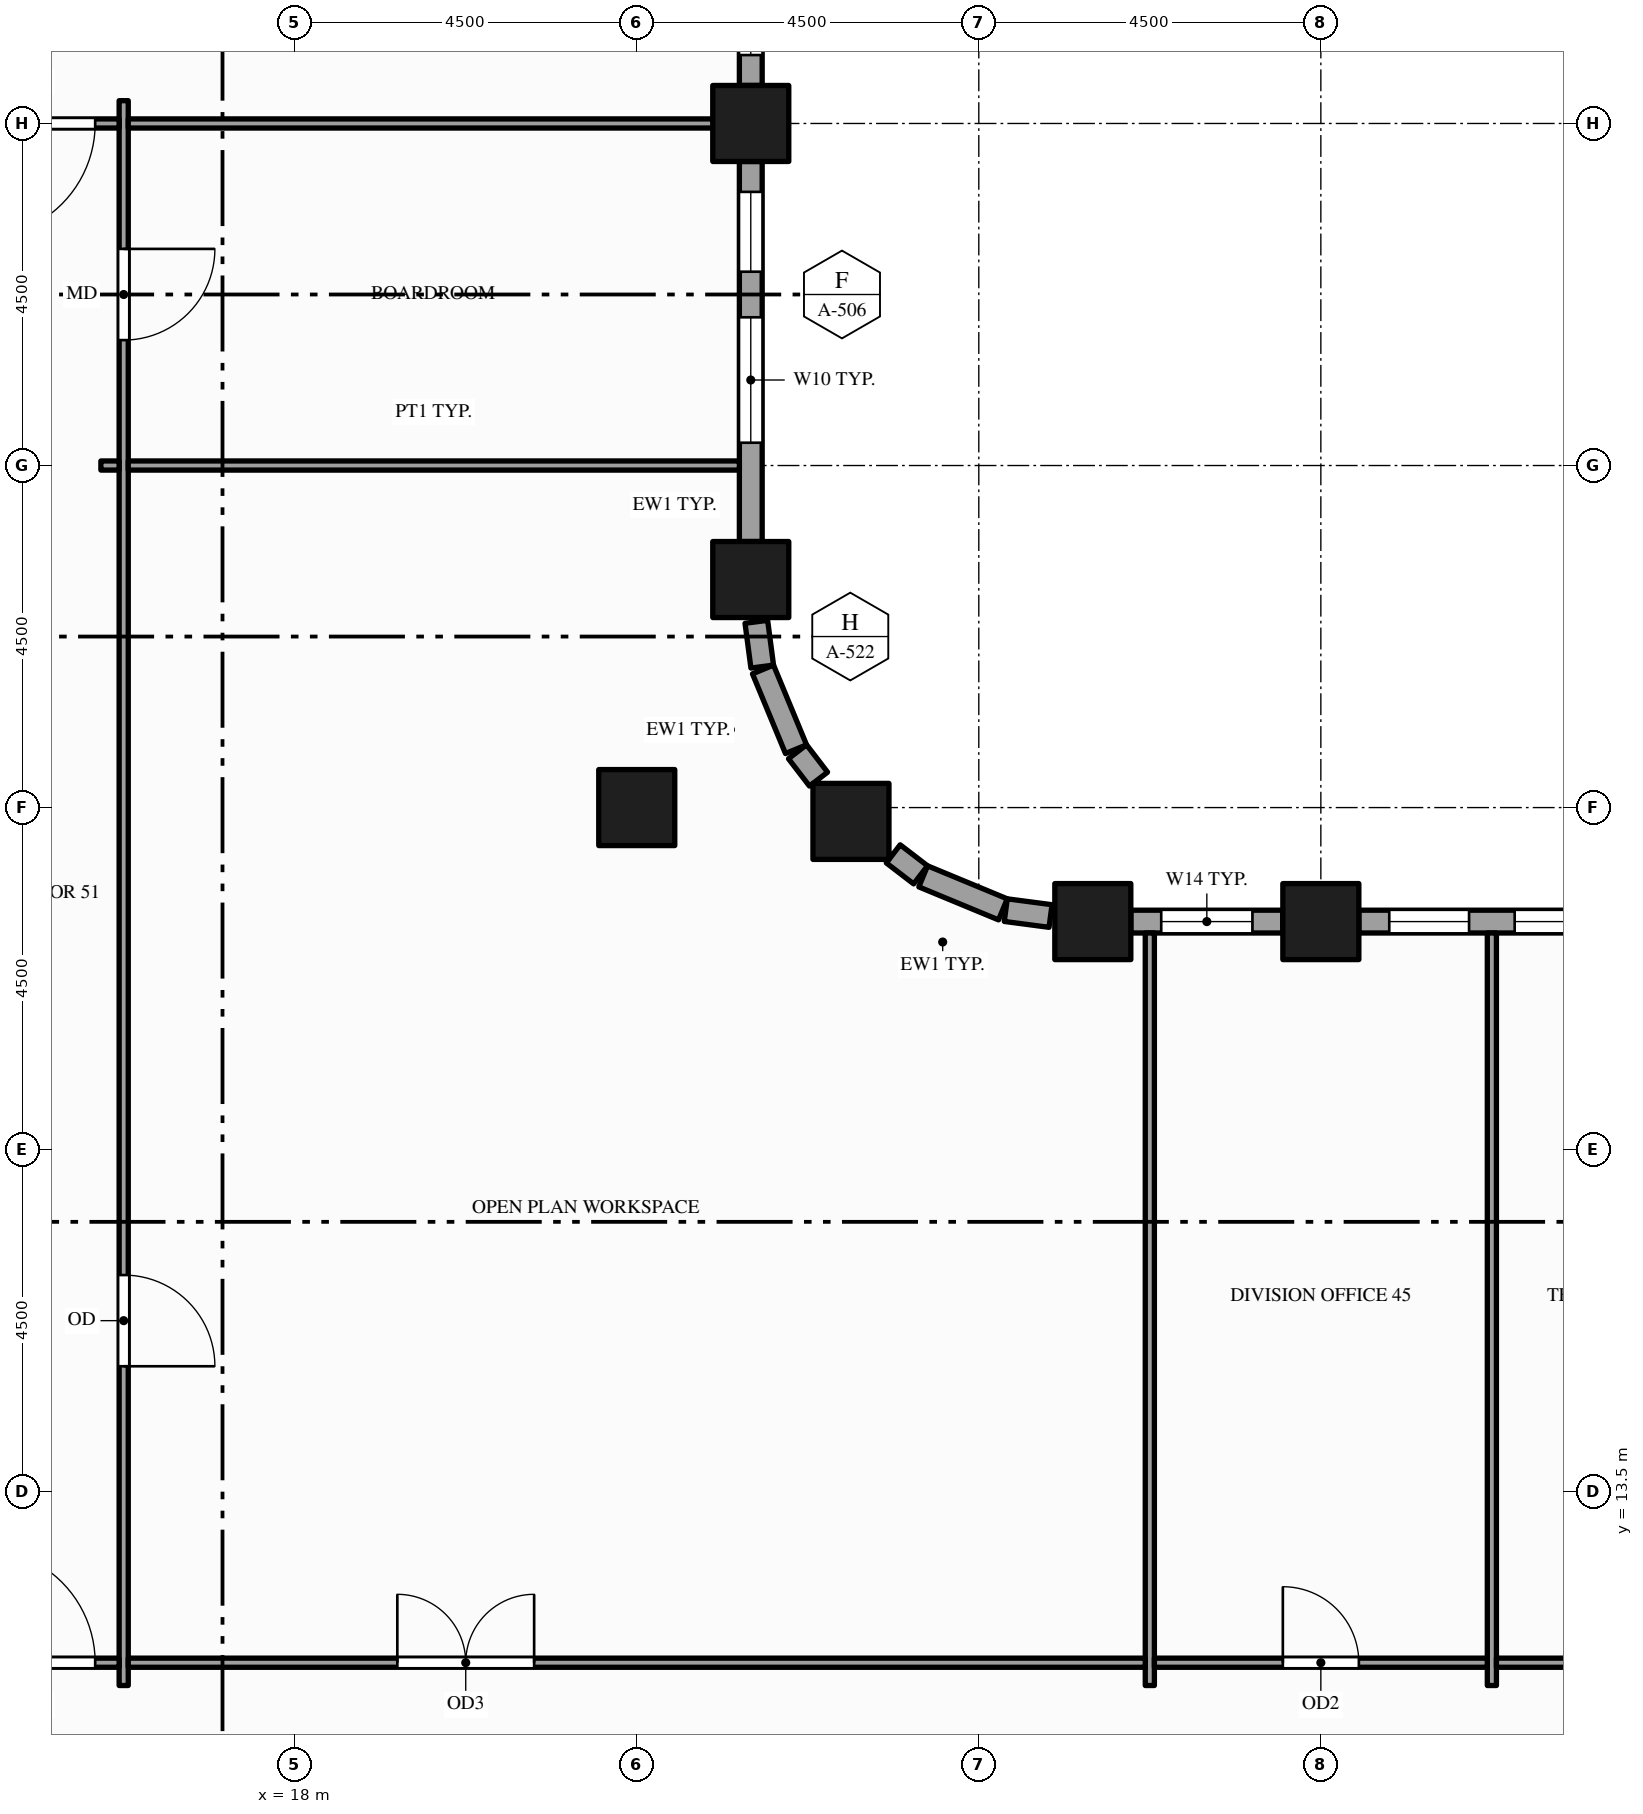
"""IFC4 building model, lengths in metres.
Left out: names, types, materials, properties, quantities, classifications, styles, units other than length and angle.
Written with IfcOpenShell. Run it as: python <this file> out.ifc"""

import sys

from ifc_helpers import new_model, si_unit, direction, frame, frame_2d, origin, origin_2d, place, context, subcontext, project, spatial, rectangle, hollow_rectangle, extrude, element, fill, save


model = new_model("IFC4")
c1 = context("Model", 3, precision=1e-05, world=origin(), true_north=direction((0.0, 1.0)))
c2 = subcontext(c1, "Body", "Model", "MODEL_VIEW")
j1 = project(units=[si_unit("LENGTHUNIT", "METRE"), si_unit("PLANEANGLEUNIT", "RADIAN")], contexts=[c1])
p1 = place(None, origin())
s1 = spatial("IfcSite", under=j1, at=p1, CompositionType="ELEMENT")
p2 = place(p1, origin())
s2 = spatial("IfcBuilding", under=s1, at=p2, CompositionType="ELEMENT")
p3 = place(p2, frame((0.0, 0.0, 95.0)))
s3 = spatial("IfcBuildingStorey", under=s2, at=p3, CompositionType="ELEMENT", Elevation=95.0)
for number, where, z_axis, x_axis in (
    (1, (22.5, 22.5, -0.15), (0.0, 0.0, 1.0), (1.0, 0.0, 0.0)),
    (2, (24.0, 25.5, -0.15), (0.0, 0.0, 1.0), (1.0, 0.0, 0.0)),
    (3, (24.0, 31.5, -0.15), (0.0, 0.0, 1.0), (1.0, 0.0, 0.0)),
    (4, (25.318, 22.318, -0.15), (0.0, 0.0, 1.0), (1.0, 0.0, 0.0)),
    (5, (28.5, 21.0, -0.15), (0.0, 0.0, 1.0), (1.0, 0.0, 0.0)),
    (6, (31.5, 21.0, -0.15), (0.0, 0.0, 1.0), (1.0, 0.0, 0.0)),
):
    element("IfcColumn", number, at=place(p3, frame(where, z_axis=z_axis, x_axis=x_axis)), inside=s3, PredefinedType="COLUMN", context=c2, shape_type="SweptSolid", body=[
        extrude(hollow_rectangle(XDim=1.0, YDim=1.0, WallThickness=0.05, at=origin_2d()), origin(), (0.0, 0.0, 1.0), 4.0),
    ])
p4 = place(p3, frame((35.5, 21.0, 0.0), z_axis=(0.0, 0.0, 1.0), x_axis=(-1.0, 0.0, 0.0)))
e7 = element("IfcWall", 7, at=p4, inside=s3, PredefinedType="STANDARD", context=c2, shape_type="SweptSolid", body=[
    extrude(rectangle(XDim=3.5, YDim=0.3, at=frame_2d((1.75, 0.0))), origin(), (0.0, 0.0, 1.0), 3.154),
])
p5 = place(p4, frame((0.4, 0.0, 0.9)))
e8 = element("IfcOpeningElement", 8, at=p5, cuts=e7, PredefinedType="OPENING", context=c2, shape_type="SweptSolid", body=[
    extrude(rectangle(XDim=1.05, YDim=2.0, at=frame_2d((0.525, 1.0))), frame((0.0, 0.16, 0.0), z_axis=(0.0, -1.0, 0.0), x_axis=(1.0, 0.0, 0.0)), (0.0, 0.0, 1.0), 0.32),
])
p6 = place(p4, frame((2.05, 0.0, 0.9)))
e9 = element("IfcOpeningElement", 9, at=p6, cuts=e7, PredefinedType="OPENING", context=c2, shape_type="SweptSolid", body=[
    extrude(rectangle(XDim=1.05, YDim=2.0, at=frame_2d((0.525, 1.0))), frame((0.0, 0.16, 0.0), z_axis=(0.0, -1.0, 0.0), x_axis=(1.0, 0.0, 0.0)), (0.0, 0.0, 1.0), 0.32),
])
p7 = place(p3, frame((31.0, 21.0, 0.0), z_axis=(0.0, 0.0, 1.0), x_axis=(-1.0, 0.0, 0.0)))
e10 = element("IfcWall", 10, at=p7, inside=s3, PredefinedType="STANDARD", context=c2, shape_type="SweptSolid", body=[
    extrude(rectangle(XDim=2.0, YDim=0.3, at=frame_2d((1.0, 0.0))), origin(), (0.0, 0.0, 1.0), 3.154),
])
p8 = place(p7, frame((0.4, 0.0, 0.9)))
e11 = element("IfcOpeningElement", 11, at=p8, cuts=e10, PredefinedType="OPENING", context=c2, shape_type="SweptSolid", body=[
    extrude(rectangle(XDim=1.2, YDim=2.0, at=frame_2d((0.6, 1.0))), frame((0.0, 0.16, 0.0), z_axis=(0.0, -1.0, 0.0), x_axis=(1.0, 0.0, 0.0)), (0.0, 0.0, 1.0), 0.32),
])
p9 = place(p3, frame((27.944, 21.073, 0.0), z_axis=(0.0, 0.0, 1.0), x_axis=(-0.991420685839, 0.130709692412, 0.0)))
e12 = element("IfcWall", 12, at=p9, inside=s3, PredefinedType="STANDARD", context=c2, shape_type="SweptSolid", body=[
    extrude(rectangle(XDim=0.594, YDim=0.3, at=frame_2d((0.297, 0.0))), origin(), (0.0, 0.0, 1.0), 3.154),
])
p10 = place(p3, frame((27.317, 21.161, 0.0), z_axis=(0.0, 0.0, 1.0), x_axis=(-0.923914616768, 0.382598720491, 0.0)))
e13 = element("IfcWall", 13, at=p10, inside=s3, PredefinedType="STANDARD", context=c2, shape_type="SweptSolid", body=[
    extrude(rectangle(XDim=1.135, YDim=0.3, at=frame_2d((0.568, 0.0))), origin(), (0.0, 0.0, 1.0), 2.938),
])
p11 = place(p3, frame((26.234, 21.615, 0.0), z_axis=(0.0, 0.0, 1.0), x_axis=(-0.793563062559, 0.608488016104, 0.0)))
e14 = element("IfcWall", 14, at=p11, inside=s3, PredefinedType="STANDARD", context=c2, shape_type="SweptSolid", body=[
    extrude(rectangle(XDim=0.454, YDim=0.3, at=frame_2d((0.227, 0.0))), origin(), (0.0, 0.0, 1.0), 3.154),
])
p12 = place(p3, frame((24.891, 22.874, 0.0), z_axis=(0.0, 0.0, 1.0), x_axis=(-0.608488016104, 0.793563062559, 0.0)))
e15 = element("IfcWall", 15, at=p12, inside=s3, PredefinedType="STANDARD", context=c2, shape_type="SweptSolid", body=[
    extrude(rectangle(XDim=0.454, YDim=0.3, at=frame_2d((0.227, 0.0))), origin(), (0.0, 0.0, 1.0), 2.76),
])
p13 = place(p3, frame((24.595, 23.268, 0.0), z_axis=(0.0, 0.0, 1.0), x_axis=(-0.382598720491, 0.923914616768, 0.0)))
e16 = element("IfcWall", 16, at=p13, inside=s3, PredefinedType="STANDARD", context=c2, shape_type="SweptSolid", body=[
    extrude(rectangle(XDim=1.135, YDim=0.3, at=frame_2d((0.568, 0.0))), origin(), (0.0, 0.0, 1.0), 3.154),
])
p14 = place(p3, frame((24.151, 24.355, 0.0), z_axis=(0.0, 0.0, 1.0), x_axis=(-0.130709692412, 0.991420685839, 0.0)))
e17 = element("IfcWall", 17, at=p14, inside=s3, PredefinedType="STANDARD", context=c2, shape_type="SweptSolid", body=[
    extrude(rectangle(XDim=0.594, YDim=0.3, at=frame_2d((0.297, 0.0))), origin(), (0.0, 0.0, 1.0), 3.154),
])
p15 = place(p3, frame((24.0, 26.0, 0.0), z_axis=(0.0, 0.0, 1.0), x_axis=(0.0, 1.0, 0.0)))
e18 = element("IfcWall", 18, at=p15, inside=s3, PredefinedType="STANDARD", context=c2, shape_type="SweptSolid", body=[
    extrude(rectangle(XDim=5.0, YDim=0.3, at=frame_2d((2.5, 0.0))), origin(), (0.0, 0.0, 1.0), 3.154),
])
p16 = place(p15, frame((1.3, 0.0, 0.9)))
e19 = element("IfcOpeningElement", 19, at=p16, cuts=e18, PredefinedType="OPENING", context=c2, shape_type="SweptSolid", body=[
    extrude(rectangle(XDim=1.65, YDim=2.0, at=frame_2d((0.825, 1.0))), frame((0.0, 0.16, 0.0), z_axis=(0.0, -1.0, 0.0), x_axis=(1.0, 0.0, 0.0)), (0.0, 0.0, 1.0), 0.32),
])
p17 = place(p15, frame((3.55, 0.0, 0.9)))
e20 = element("IfcOpeningElement", 20, at=p17, cuts=e18, PredefinedType="OPENING", context=c2, shape_type="SweptSolid", body=[
    extrude(rectangle(XDim=1.05, YDim=2.0, at=frame_2d((0.525, 1.0))), frame((0.0, 0.16, 0.0), z_axis=(0.0, -1.0, 0.0), x_axis=(1.0, 0.0, 0.0)), (0.0, 0.0, 1.0), 0.32),
])
p18 = place(p3, frame((24.0, 32.0, 0.0), z_axis=(0.0, 0.0, 1.0), x_axis=(0.0, 1.0, 0.0)))
e21 = element("IfcWall", 21, at=p18, inside=s3, PredefinedType="STANDARD", context=c2, shape_type="SweptSolid", body=[
    extrude(rectangle(XDim=3.5, YDim=0.3, at=frame_2d((1.75, 0.0))), origin(), (0.0, 0.0, 1.0), 3.154),
])
p19 = place(p18, frame((0.4, 0.0, 0.9)))
e22 = element("IfcOpeningElement", 22, at=p19, cuts=e21, PredefinedType="OPENING", context=c2, shape_type="SweptSolid", body=[
    extrude(rectangle(XDim=1.05, YDim=2.0, at=frame_2d((0.525, 1.0))), frame((0.0, 0.16, 0.0), z_axis=(0.0, -1.0, 0.0), x_axis=(1.0, 0.0, 0.0)), (0.0, 0.0, 1.0), 0.32),
])
p20 = place(p18, frame((2.05, 0.0, 0.9)))
e23 = element("IfcOpeningElement", 23, at=p20, cuts=e21, PredefinedType="OPENING", context=c2, shape_type="SweptSolid", body=[
    extrude(rectangle(XDim=1.05, YDim=2.0, at=frame_2d((0.525, 1.0))), frame((0.0, 0.16, 0.0), z_axis=(0.0, -1.0, 0.0), x_axis=(1.0, 0.0, 0.0)), (0.0, 0.0, 1.0), 0.32),
])
p21 = place(p3, frame((15.75, 10.95, 0.0), z_axis=(0.0, 0.0, 1.0), x_axis=(0.0, 1.0, 0.0)))
e24 = element("IfcWall", 24, at=p21, inside=s3, PredefinedType="PARTITIONING", context=c2, shape_type="SweptSolid", body=[
    extrude(rectangle(XDim=20.85, YDim=0.12, at=frame_2d((10.425, 0.0))), origin(), (0.0, 0.0, 1.0), 2.6),
])
p22 = place(p21, frame((17.7, 0.0, 0.0)))
e25 = element("IfcOpeningElement", 25, at=p22, cuts=e24, PredefinedType="OPENING", context=c2, shape_type="SweptSolid", body=[
    extrude(rectangle(XDim=1.2, YDim=2.1, at=frame_2d((0.6, 1.05))), frame((0.0, 0.07, 0.0), z_axis=(0.0, -1.0, 0.0), x_axis=(1.0, 0.0, 0.0)), (0.0, 0.0, 1.0), 0.14),
])
p23 = place(p21, frame((4.2, 0.0, 0.0)))
e26 = element("IfcOpeningElement", 26, at=p23, cuts=e24, PredefinedType="OPENING", context=c2, shape_type="SweptSolid", body=[
    extrude(rectangle(XDim=1.2, YDim=2.1, at=frame_2d((0.6, 1.05))), frame((0.0, 0.07, 0.0), z_axis=(0.0, -1.0, 0.0), x_axis=(1.0, 0.0, 0.0)), (0.0, 0.0, 1.0), 0.14),
])
for number, where, z_axis, x_axis in (
    (27, (29.25, 10.95, 0.0), (0.0, 0.0, 1.0), (0.0, 1.0, 0.0)),
    (28, (33.75, 10.95, 0.0), (0.0, 0.0, 1.0), (0.0, 1.0, 0.0)),
):
    element("IfcWall", number, at=place(p3, frame(where, z_axis=z_axis, x_axis=x_axis)), inside=s3, PredefinedType="PARTITIONING", context=c2, shape_type="SweptSolid", body=[
        extrude(rectangle(XDim=9.9, YDim=0.12, at=frame_2d((4.95, 0.0))), origin(), (0.0, 0.0, 1.0), 2.938),
    ])
p24 = place(p3, frame((13.56, 11.25, 0.0), z_axis=(0.0, 0.0, 1.0), x_axis=(1.0, 0.0, 0.0)))
e29 = element("IfcWall", 29, at=p24, inside=s3, PredefinedType="PARTITIONING", context=c2, shape_type="SweptSolid", body=[
    extrude(rectangle(XDim=2.13, YDim=0.12, at=frame_2d((1.065, 0.0))), origin(), (0.0, 0.0, 1.0), 2.938),
])
p25 = place(p24, frame((0.315, 0.0, 0.0)))
e30 = element("IfcOpeningElement", 30, at=p25, cuts=e29, PredefinedType="OPENING", context=c2, shape_type="SweptSolid", body=[
    extrude(rectangle(XDim=1.5, YDim=2.1, at=frame_2d((0.75, 1.05))), frame((0.0, 0.07, 0.0), z_axis=(0.0, -1.0, 0.0), x_axis=(1.0, 0.0, 0.0)), (0.0, 0.0, 1.0), 0.14),
])
p26 = place(p3, frame((15.81, 11.25, 0.0), z_axis=(0.0, 0.0, 1.0), x_axis=(1.0, 0.0, 0.0)))
e31 = element("IfcWall", 31, at=p26, inside=s3, PredefinedType="PARTITIONING", context=c2, shape_type="SweptSolid", body=[
    extrude(rectangle(XDim=13.38, YDim=0.12, at=frame_2d((6.69, 0.0))), origin(), (0.0, 0.0, 1.0), 2.76),
])
p27 = place(p26, frame((3.54, 0.0, 0.0)))
e32 = element("IfcOpeningElement", 32, at=p27, cuts=e31, PredefinedType="OPENING", context=c2, shape_type="SweptSolid", body=[
    extrude(rectangle(XDim=1.8, YDim=2.1, at=frame_2d((0.9, 1.05))), frame((0.0, 0.07, 0.0), z_axis=(0.0, -1.0, 0.0), x_axis=(1.0, 0.0, 0.0)), (0.0, 0.0, 1.0), 0.14),
])
p28 = place(p3, frame((29.31, 11.25, 0.0), z_axis=(0.0, 0.0, 1.0), x_axis=(1.0, 0.0, 0.0)))
e33 = element("IfcWall", 33, at=p28, inside=s3, PredefinedType="PARTITIONING", context=c2, shape_type="SweptSolid", body=[
    extrude(rectangle(XDim=4.38, YDim=0.12, at=frame_2d((2.19, 0.0))), origin(), (0.0, 0.0, 1.0), 2.938),
])
p29 = place(p28, frame((1.69, 0.0, 0.0)))
e34 = element("IfcOpeningElement", 34, at=p29, cuts=e33, PredefinedType="OPENING", context=c2, shape_type="SweptSolid", body=[
    extrude(rectangle(XDim=1.0, YDim=2.1, at=frame_2d((0.5, 1.05))), frame((0.0, 0.07, 0.0), z_axis=(0.0, -1.0, 0.0), x_axis=(1.0, 0.0, 0.0)), (0.0, 0.0, 1.0), 0.14),
])
p30 = place(p3, frame((33.81, 11.25, 0.0), z_axis=(0.0, 0.0, 1.0), x_axis=(1.0, 0.0, 0.0)))
e35 = element("IfcWall", 35, at=p30, inside=s3, PredefinedType="PARTITIONING", context=c2, shape_type="SweptSolid", body=[
    extrude(rectangle(XDim=4.38, YDim=0.12, at=frame_2d((2.19, 0.0))), origin(), (0.0, 0.0, 1.0), 2.938),
])
p31 = place(p30, frame((1.69, 0.0, 0.0)))
e36 = element("IfcOpeningElement", 36, at=p31, cuts=e35, PredefinedType="OPENING", context=c2, shape_type="SweptSolid", body=[
    extrude(rectangle(XDim=1.0, YDim=2.1, at=frame_2d((0.5, 1.05))), frame((0.0, 0.07, 0.0), z_axis=(0.0, -1.0, 0.0), x_axis=(1.0, 0.0, 0.0)), (0.0, 0.0, 1.0), 0.14),
])
p32 = place(p3, frame((15.45, 27.0, 0.0), z_axis=(0.0, 0.0, 1.0), x_axis=(1.0, 0.0, 0.0)))
e37 = element("IfcWall", 37, at=p32, inside=s3, PredefinedType="PARTITIONING", context=c2, shape_type="SweptSolid", body=[
    extrude(rectangle(XDim=0.24, YDim=0.12, at=frame_2d((0.12, 0.0))), origin(), (0.0, 0.0, 1.0), 2.938),
])
p33 = place(p3, frame((15.81, 27.0, 0.0), z_axis=(0.0, 0.0, 1.0), x_axis=(1.0, 0.0, 0.0)))
e38 = element("IfcWall", 38, at=p33, inside=s3, PredefinedType="PARTITIONING", context=c2, shape_type="SweptSolid", body=[
    extrude(rectangle(XDim=8.04, YDim=0.12, at=frame_2d((4.02, 0.0))), origin(), (0.0, 0.0, 1.0), 2.938),
])
p34 = place(p3, frame((13.56, 31.5, 0.0), z_axis=(0.0, 0.0, 1.0), x_axis=(1.0, 0.0, 0.0)))
e39 = element("IfcWall", 39, at=p34, inside=s3, PredefinedType="PARTITIONING", context=c2, shape_type="SweptSolid", body=[
    extrude(rectangle(XDim=2.13, YDim=0.12, at=frame_2d((1.065, 0.0))), origin(), (0.0, 0.0, 1.0), 2.938),
])
p35 = place(p34, frame((0.315, 0.0, 0.0)))
e40 = element("IfcOpeningElement", 40, at=p35, cuts=e39, PredefinedType="OPENING", context=c2, shape_type="SweptSolid", body=[
    extrude(rectangle(XDim=1.5, YDim=2.1, at=frame_2d((0.75, 1.05))), frame((0.0, 0.07, 0.0), z_axis=(0.0, -1.0, 0.0), x_axis=(1.0, 0.0, 0.0)), (0.0, 0.0, 1.0), 0.14),
])
p36 = place(p3, frame((15.81, 31.5, 0.0), z_axis=(0.0, 0.0, 1.0), x_axis=(1.0, 0.0, 0.0)))
e41 = element("IfcWall", 41, at=p36, inside=s3, PredefinedType="PARTITIONING", context=c2, shape_type="SweptSolid", body=[
    extrude(rectangle(XDim=8.04, YDim=0.12, at=frame_2d((4.02, 0.0))), origin(), (0.0, 0.0, 1.0), 2.938),
])
p37 = place(p5, origin())
e42 = element("IfcWindow", 42, at=p37, inside=s3, PartitioningType="SINGLE_PANEL", PredefinedType="WINDOW", context=c2, shape_type="SweptSolid", body=[
    extrude(rectangle(XDim=1.05, YDim=2.0, at=frame_2d((0.525, 1.0))), frame((0.0, 0.03, 0.0), z_axis=(0.0, -1.0, 0.0), x_axis=(1.0, 0.0, 0.0)), (0.0, 0.0, 1.0), 0.06),
])
fill(e8, e42)
p38 = place(p6, origin())
e43 = element("IfcWindow", 43, at=p38, inside=s3, PartitioningType="SINGLE_PANEL", PredefinedType="WINDOW", context=c2, shape_type="SweptSolid", body=[
    extrude(rectangle(XDim=1.05, YDim=2.0, at=frame_2d((0.525, 1.0))), frame((0.0, 0.03, 0.0), z_axis=(0.0, -1.0, 0.0), x_axis=(1.0, 0.0, 0.0)), (0.0, 0.0, 1.0), 0.06),
])
fill(e9, e43)
p39 = place(p8, origin())
e44 = element("IfcWindow", 44, at=p39, inside=s3, PartitioningType="SINGLE_PANEL", PredefinedType="WINDOW", context=c2, shape_type="SweptSolid", body=[
    extrude(rectangle(XDim=1.2, YDim=2.0, at=frame_2d((0.6, 1.0))), frame((0.0, 0.03, 0.0), z_axis=(0.0, -1.0, 0.0), x_axis=(1.0, 0.0, 0.0)), (0.0, 0.0, 1.0), 0.06),
])
fill(e11, e44)
p40 = place(p16, origin())
e45 = element("IfcWindow", 45, at=p40, inside=s3, PartitioningType="SINGLE_PANEL", PredefinedType="WINDOW", context=c2, shape_type="SweptSolid", body=[
    extrude(rectangle(XDim=1.65, YDim=2.0, at=frame_2d((0.825, 1.0))), frame((0.0, 0.03, 0.0), z_axis=(0.0, -1.0, 0.0), x_axis=(1.0, 0.0, 0.0)), (0.0, 0.0, 1.0), 0.06),
])
fill(e19, e45)
p41 = place(p17, origin())
e46 = element("IfcWindow", 46, at=p41, inside=s3, PartitioningType="SINGLE_PANEL", PredefinedType="WINDOW", context=c2, shape_type="SweptSolid", body=[
    extrude(rectangle(XDim=1.05, YDim=2.0, at=frame_2d((0.525, 1.0))), frame((0.0, 0.03, 0.0), z_axis=(0.0, -1.0, 0.0), x_axis=(1.0, 0.0, 0.0)), (0.0, 0.0, 1.0), 0.06),
])
fill(e20, e46)
p42 = place(p19, origin())
e47 = element("IfcWindow", 47, at=p42, inside=s3, PartitioningType="SINGLE_PANEL", PredefinedType="WINDOW", context=c2, shape_type="SweptSolid", body=[
    extrude(rectangle(XDim=1.05, YDim=2.0, at=frame_2d((0.525, 1.0))), frame((0.0, 0.03, 0.0), z_axis=(0.0, -1.0, 0.0), x_axis=(1.0, 0.0, 0.0)), (0.0, 0.0, 1.0), 0.06),
])
fill(e22, e47)
p43 = place(p29, origin())
e48 = element("IfcDoor", 48, at=p43, inside=s3, OperationType="SINGLE_SWING_LEFT", PredefinedType="DOOR", context=c2, shape_type="SweptSolid", body=[
    extrude(rectangle(XDim=1.0, YDim=2.1, at=frame_2d((0.5, 1.05))), frame((0.0, 0.025, 0.0), z_axis=(0.0, -1.0, 0.0), x_axis=(1.0, 0.0, 0.0)), (0.0, 0.0, 1.0), 0.05),
])
fill(e34, e48)
p44 = place(p27, origin())
e49 = element("IfcDoor", 49, at=p44, inside=s3, OperationType="DOUBLE_DOOR_SINGLE_SWING", PredefinedType="DOOR", context=c2, shape_type="SweptSolid", body=[
    extrude(rectangle(XDim=1.8, YDim=2.1, at=frame_2d((0.9, 1.05))), frame((0.0, 0.025, 0.0), z_axis=(0.0, -1.0, 0.0), x_axis=(1.0, 0.0, 0.0)), (0.0, 0.0, 1.0), 0.05),
])
fill(e32, e49)
p45 = place(p25, origin())
e50 = element("IfcDoor", 50, at=p45, inside=s3, OperationType="SINGLE_SWING_LEFT", PredefinedType="DOOR", context=c2, shape_type="SweptSolid", body=[
    extrude(rectangle(XDim=1.5, YDim=2.1, at=frame_2d((0.75, 1.05))), frame((0.0, 0.025, 0.0), z_axis=(0.0, -1.0, 0.0), x_axis=(1.0, 0.0, 0.0)), (0.0, 0.0, 1.0), 0.05),
])
fill(e30, e50)
p46 = place(p35, origin())
e51 = element("IfcDoor", 51, at=p46, inside=s3, OperationType="SINGLE_SWING_LEFT", PredefinedType="DOOR", context=c2, shape_type="SweptSolid", body=[
    extrude(rectangle(XDim=1.5, YDim=2.1, at=frame_2d((0.75, 1.05))), frame((0.0, 0.025, 0.0), z_axis=(0.0, -1.0, 0.0), x_axis=(1.0, 0.0, 0.0)), (0.0, 0.0, 1.0), 0.05),
])
fill(e40, e51)
p47 = place(p22, origin())
e52 = element("IfcDoor", 52, at=p47, inside=s3, OperationType="SINGLE_SWING_RIGHT", PredefinedType="DOOR", context=c2, shape_type="SweptSolid", body=[
    extrude(rectangle(XDim=1.2, YDim=2.1, at=frame_2d((0.6, 1.05))), frame((0.0, 0.025, 0.0), z_axis=(0.0, -1.0, 0.0), x_axis=(1.0, 0.0, 0.0)), (0.0, 0.0, 1.0), 0.05),
])
fill(e25, e52)
p48 = place(p23, origin())
e53 = element("IfcDoor", 53, at=p48, inside=s3, OperationType="SINGLE_SWING_LEFT", PredefinedType="DOOR", context=c2, shape_type="SweptSolid", body=[
    extrude(rectangle(XDim=1.2, YDim=2.1, at=frame_2d((0.6, 1.05))), frame((0.0, 0.025, 0.0), z_axis=(0.0, -1.0, 0.0), x_axis=(1.0, 0.0, 0.0)), (0.0, 0.0, 1.0), 0.05),
])
fill(e26, e53)
save(model, sys.argv[1])
